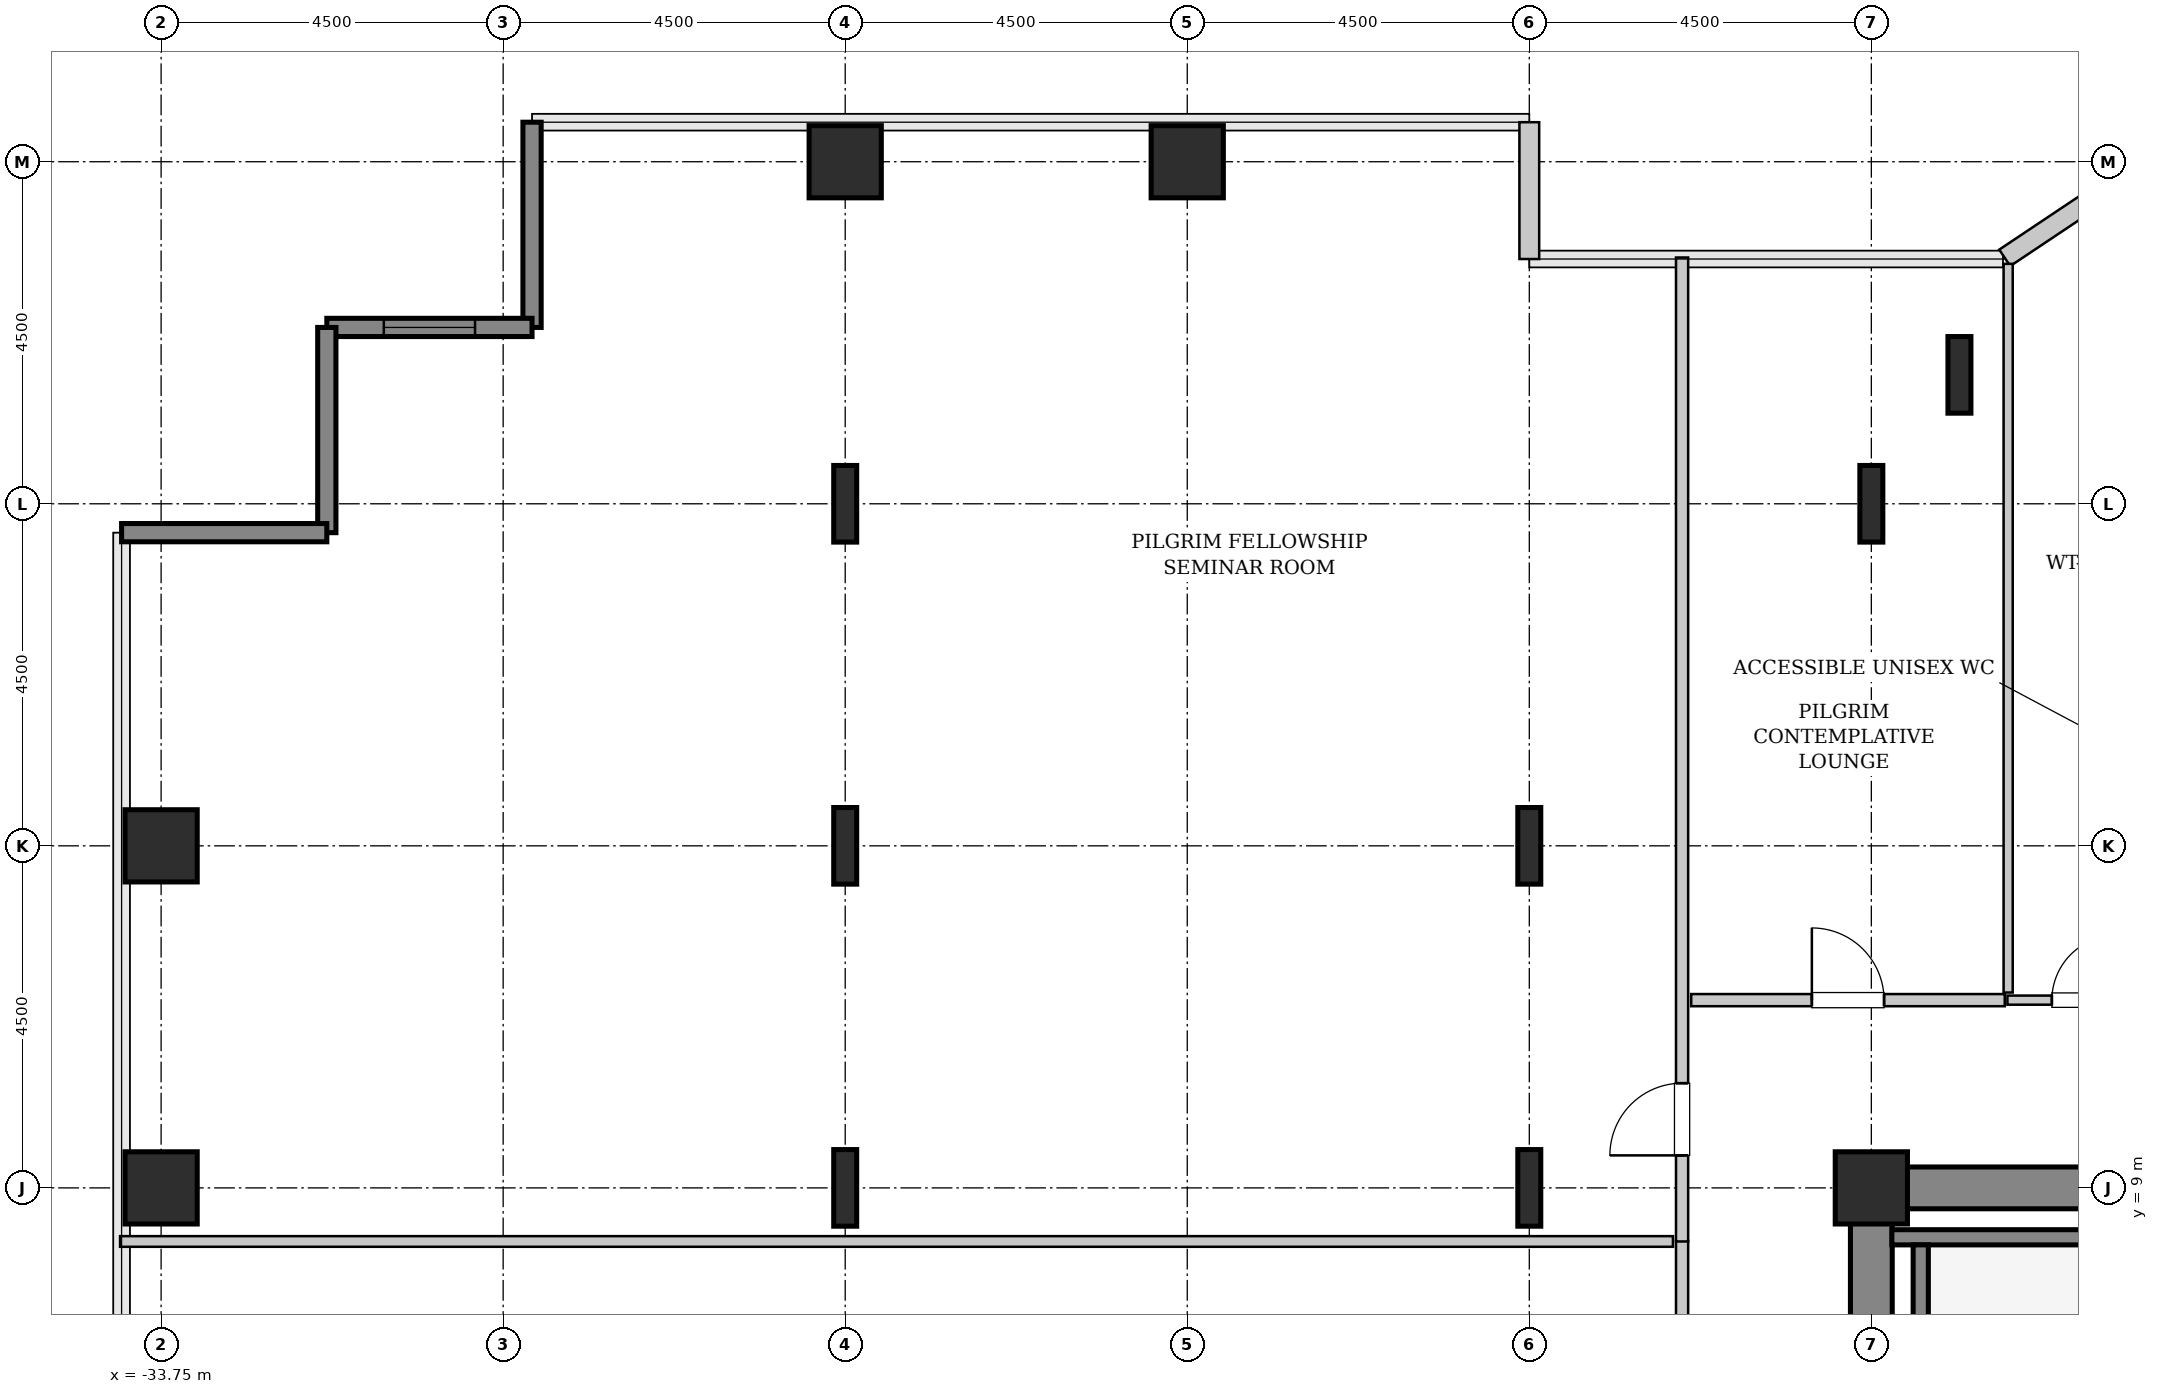
"""IFC4 building model, lengths in metres.
Left out: names, types, materials, properties, quantities, classifications, styles, units other than length and angle.
Written with IfcOpenShell. Run it as: python <this file> out.ifc"""

import sys

from ifc_helpers import new_model, si_unit, direction, frame, frame_2d, origin, origin_2d, place, context, subcontext, project, spatial, rectangle, hollow_rectangle, i_section, extrude, source, transform, mapped, element, fill, save


model = new_model("IFC4")
c1 = context("Model", 3, precision=1e-05, world=origin(), true_north=direction((0.0, 1.0)))
c2 = subcontext(c1, "Body", "Model", "MODEL_VIEW")
j1 = project(units=[si_unit("LENGTHUNIT", "METRE"), si_unit("PLANEANGLEUNIT", "RADIAN")], contexts=[c1])
p1 = place(None, origin())
s1 = spatial("IfcSite", under=j1, at=p1, CompositionType="ELEMENT")
p2 = place(p1, origin())
s2 = spatial("IfcBuilding", under=s1, at=p2, CompositionType="ELEMENT")
p3 = place(p2, frame((0.0, 0.0, 94.6)))
s3 = spatial("IfcBuildingStorey", under=s2, at=p3, CompositionType="ELEMENT", Elevation=94.6)
m1 = source(origin(), c2, "Body", "SweptSolid", [
    extrude(rectangle(XDim=9.975, YDim=0.55, at=frame_2d((4.987, 0.0))), origin(), (0.0, 0.0, 1.0), 3.8),
])
p4 = place(p3, frame((-11.525, 9.0, 0.0), z_axis=(0.0, 0.0, 1.0), x_axis=(1.0, 0.0, 0.0)))
e1 = element("IfcWall", 1, at=p4, inside=s3, PredefinedType="SHEAR", context=c2, shape_type="MappedRepresentation", body=[
    mapped(m1, transform((0.0, 0.0, 0.0), x_axis=(1.0, 0.0, 0.0), y_axis=(0.0, 1.0, 0.0), z_axis=(0.0, 0.0, 1.0), scale=1.0)),
])
m2 = source(origin(), c2, "Body", "SweptSolid", [
    extrude(rectangle(XDim=7.375, YDim=0.55, at=frame_2d((3.688, 0.0))), origin(), (0.0, 0.0, 1.0), 3.8),
])
p5 = place(p3, frame((-11.25, 1.35, 0.0), z_axis=(0.0, 0.0, 1.0), x_axis=(0.0, 1.0, 0.0)))
e2 = element("IfcWall", 2, at=p5, inside=s3, PredefinedType="SHEAR", context=c2, shape_type="MappedRepresentation", body=[
    mapped(m2, transform((0.0, 0.0, 0.0), x_axis=(1.0, 0.0, 0.0), y_axis=(0.0, 1.0, 0.0), z_axis=(0.0, 0.0, 1.0), scale=1.0)),
])
m3 = source(origin(), c2, "Body", "SweptSolid", [
    extrude(hollow_rectangle(XDim=0.95, YDim=0.95, WallThickness=0.045, InnerFilletRadius=0.045, OuterFilletRadius=0.09, at=origin_2d()), origin(), (0.0, 0.0, 1.0), 3.8),
])
for number, where, z_axis, x_axis in (
    (3, (-33.75, 9.0, 0.0), (0.0, 0.0, 1.0), (1.0, 0.0, 0.0)),
    (4, (-33.75, 13.5, 0.0), (0.0, 0.0, 1.0), (1.0, 0.0, 0.0)),
):
    element("IfcColumn", number, at=place(p3, frame(where, z_axis=z_axis, x_axis=x_axis)), inside=s3, PredefinedType="COLUMN", context=c2, shape_type="MappedRepresentation", body=[
        mapped(m3, transform((0.0, 0.0, 0.0), x_axis=(1.0, 0.0, 0.0), y_axis=(0.0, 1.0, 0.0), z_axis=(0.0, 0.0, 1.0), scale=1.0)),
    ])
m4 = source(origin(), c2, "Body", "SweptSolid", [
    extrude(i_section(OverallWidth=0.302, OverallDepth=1.008, WebThickness=0.021, FlangeThickness=0.04, FilletRadius=0.03, at=origin_2d()), origin(), (0.0, 0.0, 1.0), 3.8),
])
for number, where, z_axis, x_axis in (
    (5, (-24.75, 9.0, 0.0), (0.0, 0.0, 1.0), (1.0, 0.0, 0.0)),
    (6, (-24.75, 13.5, 0.0), (0.0, 0.0, 1.0), (1.0, 0.0, 0.0)),
    (7, (-24.75, 18.0, 0.0), (0.0, 0.0, 1.0), (1.0, 0.0, 0.0)),
):
    element("IfcColumn", number, at=place(p3, frame(where, z_axis=z_axis, x_axis=x_axis)), inside=s3, PredefinedType="COLUMN", context=c2, shape_type="MappedRepresentation", body=[
        mapped(m4, transform((0.0, 0.0, 0.0), x_axis=(1.0, 0.0, 0.0), y_axis=(0.0, 1.0, 0.0), z_axis=(0.0, 0.0, 1.0), scale=1.0)),
    ])
for number, where, z_axis, x_axis in (
    (8, (-24.75, 22.5, 0.0), (0.0, 0.0, 1.0), (1.0, 0.0, 0.0)),
    (9, (-20.25, 22.5, 0.0), (0.0, 0.0, 1.0), (1.0, 0.0, 0.0)),
):
    element("IfcColumn", number, at=place(p3, frame(where, z_axis=z_axis, x_axis=x_axis)), inside=s3, PredefinedType="COLUMN", context=c2, shape_type="MappedRepresentation", body=[
        mapped(m3, transform((0.0, 0.0, 0.0), x_axis=(1.0, 0.0, 0.0), y_axis=(0.0, 1.0, 0.0), z_axis=(0.0, 0.0, 1.0), scale=1.0)),
    ])
for number, where, z_axis, x_axis in (
    (10, (-15.75, 9.0, 0.0), (0.0, 0.0, 1.0), (1.0, 0.0, 0.0)),
    (11, (-15.75, 13.5, 0.0), (0.0, 0.0, 1.0), (1.0, 0.0, 0.0)),
):
    element("IfcColumn", number, at=place(p3, frame(where, z_axis=z_axis, x_axis=x_axis)), inside=s3, PredefinedType="COLUMN", context=c2, shape_type="MappedRepresentation", body=[
        mapped(m4, transform((0.0, 0.0, 0.0), x_axis=(1.0, 0.0, 0.0), y_axis=(0.0, 1.0, 0.0), z_axis=(0.0, 0.0, 1.0), scale=1.0)),
    ])
m5 = source(origin(), c2, "Body", "SweptSolid", [
    extrude(hollow_rectangle(XDim=0.95, YDim=0.95, WallThickness=0.045, InnerFilletRadius=0.045, OuterFilletRadius=0.09, at=origin_2d()), origin(), (0.0, 0.0, 1.0), 3.8),
])
p6 = place(p3, frame((-11.25, 9.0, 0.0), z_axis=(0.0, 0.0, 1.0), x_axis=(1.0, 0.0, 0.0)))
e12 = element("IfcColumn", 12, at=p6, inside=s3, PredefinedType="COLUMN", context=c2, shape_type="MappedRepresentation", body=[
    mapped(m5, transform((0.0, 0.0, 0.0), x_axis=(1.0, 0.0, 0.0), y_axis=(0.0, 1.0, 0.0), z_axis=(0.0, 0.0, 1.0), scale=1.0)),
])
for number, where, z_axis, x_axis in (
    (13, (-11.25, 18.0, 0.0), (0.0, 0.0, 1.0), (1.0, 0.0, 0.0)),
    (14, (-10.091, 19.696, 0.0), (0.0, 0.0, 1.0), (1.0, 0.0, 0.0)),
):
    element("IfcColumn", number, at=place(p3, frame(where, z_axis=z_axis, x_axis=x_axis)), inside=s3, PredefinedType="COLUMN", context=c2, shape_type="MappedRepresentation", body=[
        mapped(m4, transform((0.0, 0.0, 0.0), x_axis=(1.0, 0.0, 0.0), y_axis=(0.0, 1.0, 0.0), z_axis=(0.0, 0.0, 1.0), scale=1.0)),
    ])
m6 = source(origin(), c2, "Body", "SweptSolid", [
    extrude(rectangle(XDim=1.469, YDim=0.26, at=frame_2d((0.734, 0.0))), origin(), (0.0, 0.0, 1.0), 3.55),
])
p7 = place(p3, frame((-8.273, 22.052, 0.0), z_axis=(0.0, 0.0, 1.0), x_axis=(-0.831461760506, -0.555581983884, 0.0)))
e15 = element("IfcWall", 15, at=p7, inside=s3, PredefinedType="SOLIDWALL", context=c2, shape_type="MappedRepresentation", body=[
    mapped(m6, transform((0.0, 0.0, 0.0), x_axis=(1.0, 0.0, 0.0), y_axis=(0.0, 1.0, 0.0), z_axis=(0.0, 0.0, 1.0), scale=1.0)),
])
m7 = source(origin(), c2, "Body", "SweptSolid", [
    extrude(rectangle(XDim=1.8, YDim=0.26, at=frame_2d((0.9, 0.0))), origin(), (0.0, 0.0, 1.0), 3.55),
])
p8 = place(p3, frame((-15.75, 21.22, 0.0), z_axis=(0.0, 0.0, 1.0), x_axis=(0.0, 1.0, 0.0)))
e16 = element("IfcWall", 16, at=p8, inside=s3, PredefinedType="SOLIDWALL", context=c2, shape_type="MappedRepresentation", body=[
    mapped(m7, transform((0.0, 0.0, 0.0), x_axis=(1.0, 0.0, 0.0), y_axis=(0.0, 1.0, 0.0), z_axis=(0.0, 0.0, 1.0), scale=1.0)),
])
m8 = source(origin(), c2, "Body", "SweptSolid", [
    extrude(rectangle(XDim=2.7, YDim=0.24, at=frame_2d((1.35, 0.0))), origin(), (0.0, 0.0, 1.0), 3.55),
])
p9 = place(p3, frame((-28.87, 23.02, 0.0), z_axis=(0.0, 0.0, 1.0), x_axis=(0.0, -1.0, 0.0)))
e17 = element("IfcWall", 17, at=p9, inside=s3, PredefinedType="SHEAR", context=c2, shape_type="MappedRepresentation", body=[
    mapped(m8, transform((0.0, 0.0, 0.0), x_axis=(1.0, 0.0, 0.0), y_axis=(0.0, 1.0, 0.0), z_axis=(0.0, 0.0, 1.0), scale=1.0)),
])
p10 = place(p3, frame((-28.87, 20.32, 0.0), z_axis=(0.0, 0.0, 1.0), x_axis=(-1.0, 0.0, 0.0)))
e18 = element("IfcWall", 18, at=p10, inside=s3, PredefinedType="SHEAR", context=c2, shape_type="MappedRepresentation", body=[
    mapped(m8, transform((0.0, 0.0, 0.0), x_axis=(1.0, 0.0, 0.0), y_axis=(0.0, 1.0, 0.0), z_axis=(0.0, 0.0, 1.0), scale=1.0)),
])
p11 = place(p10, frame((0.75, 0.0, 0.85)))
e19 = element("IfcOpeningElement", 19, at=p11, cuts=e18, PredefinedType="OPENING", context=c2, shape_type="SweptSolid", body=[
    extrude(rectangle(XDim=1.2, YDim=1.8, at=frame_2d((0.6, 0.9))), frame((0.0, 0.13, 0.0), z_axis=(0.0, -1.0, 0.0), x_axis=(1.0, 0.0, 0.0)), (0.0, 0.0, 1.0), 0.26),
])
for number, where, z_axis, x_axis in (
    (20, (-31.57, 20.32, 0.0), (0.0, 0.0, 1.0), (0.0, -1.0, 0.0)),
    (21, (-31.57, 17.62, 0.0), (0.0, 0.0, 1.0), (-1.0, 0.0, 0.0)),
):
    element("IfcWall", number, at=place(p3, frame(where, z_axis=z_axis, x_axis=x_axis)), inside=s3, PredefinedType="SHEAR", context=c2, shape_type="MappedRepresentation", body=[
        mapped(m8, transform((0.0, 0.0, 0.0), x_axis=(1.0, 0.0, 0.0), y_axis=(0.0, 1.0, 0.0), z_axis=(0.0, 0.0, 1.0), scale=1.0)),
    ])
m9 = source(origin(), c2, "Body", "SweptSolid", [
    extrude(rectangle(XDim=3.68, YDim=0.2, at=frame_2d((1.84, 0.0))), origin(), (0.0, 0.0, 1.0), 3.8),
])
p12 = place(p3, frame((-7.3, 8.35, 0.0), z_axis=(0.0, 0.0, 1.0), x_axis=(-1.0, 0.0, 0.0)))
e22 = element("IfcWall", 22, at=p12, inside=s3, PredefinedType="SOLIDWALL", context=c2, shape_type="MappedRepresentation", body=[
    mapped(m9, transform((0.0, 0.0, 0.0), x_axis=(1.0, 0.0, 0.0), y_axis=(0.0, 1.0, 0.0), z_axis=(0.0, 0.0, 1.0), scale=1.0)),
])
m10 = source(origin(), c2, "Body", "SweptSolid", [
    extrude(rectangle(XDim=7.1, YDim=0.2, at=frame_2d((3.55, 0.0))), origin(), (0.0, 0.0, 1.0), 3.8),
])
p13 = place(p3, frame((-10.6, 1.15, 0.0), z_axis=(0.0, 0.0, 1.0), x_axis=(0.0, 1.0, 0.0)))
e23 = element("IfcWall", 23, at=p13, inside=s3, PredefinedType="SOLIDWALL", context=c2, shape_type="MappedRepresentation", body=[
    mapped(m10, transform((0.0, 0.0, 0.0), x_axis=(1.0, 0.0, 0.0), y_axis=(0.0, 1.0, 0.0), z_axis=(0.0, 0.0, 1.0), scale=1.0)),
])
m11 = source(origin(), c2, "Body", "SweptSolid", [
    extrude(rectangle(XDim=2.02, YDim=0.12, at=frame_2d((1.01, 0.0))), origin(), (0.0, 0.0, 1.0), 3.535),
])
p14 = place(p3, frame((-9.46, 11.47, 0.0), z_axis=(0.0, 0.0, 1.0), x_axis=(1.0, 0.0, 0.0)))
e24 = element("IfcWall", 24, at=p14, inside=s3, PredefinedType="PLUMBINGWALL", context=c2, shape_type="MappedRepresentation", body=[
    mapped(m11, transform((0.0, 0.0, 0.0), x_axis=(1.0, 0.0, 0.0), y_axis=(0.0, 1.0, 0.0), z_axis=(0.0, 0.0, 1.0), scale=1.0)),
])
p15 = place(p14, frame((0.585, 0.0, 0.0)))
e25 = element("IfcOpeningElement", 25, at=p15, cuts=e24, PredefinedType="OPENING", context=c2, shape_type="SweptSolid", body=[
    extrude(rectangle(XDim=0.85, YDim=2.1, at=frame_2d((0.425, 1.05))), frame((0.0, 0.07, 0.0), z_axis=(0.0, -1.0, 0.0), x_axis=(1.0, 0.0, 0.0)), (0.0, 0.0, 1.0), 0.14),
])
m12 = source(origin(), c2, "Body", "SweptSolid", [
    extrude(rectangle(XDim=9.587, YDim=0.12, at=frame_2d((4.793, 0.0))), origin(), (0.0, 0.0, 1.0), 3.535),
])
p16 = place(p3, frame((-9.45, 11.57, 0.0), z_axis=(0.0, 0.0, 1.0), x_axis=(0.0, 1.0, 0.0)))
e26 = element("IfcWall", 26, at=p16, inside=s3, PredefinedType="PLUMBINGWALL", context=c2, shape_type="MappedRepresentation", body=[
    mapped(m12, transform((0.0, 0.0, 0.0), x_axis=(1.0, 0.0, 0.0), y_axis=(0.0, 1.0, 0.0), z_axis=(0.0, 0.0, 1.0), scale=1.0)),
])
m13 = source(origin(), c2, "Body", "SweptSolid", [
    extrude(rectangle(XDim=3.3, YDim=0.16, at=frame_2d((1.65, 0.0))), origin(), (0.0, 0.0, 1.0), 3.535),
])
p17 = place(p3, frame((-13.74, 5.005, 0.0), z_axis=(0.0, 0.0, 1.0), x_axis=(0.0, 1.0, 0.0)))
e27 = element("IfcWall", 27, at=p17, inside=s3, PredefinedType="PARTITIONING", context=c2, shape_type="MappedRepresentation", body=[
    mapped(m13, transform((0.0, 0.0, 0.0), x_axis=(1.0, 0.0, 0.0), y_axis=(0.0, 1.0, 0.0), z_axis=(0.0, 0.0, 1.0), scale=1.0)),
])
p18 = place(p17, frame((1.175, 0.0, 0.0)))
e28 = element("IfcOpeningElement", 28, at=p18, cuts=e27, PredefinedType="OPENING", context=c2, shape_type="SweptSolid", body=[
    extrude(rectangle(XDim=0.95, YDim=2.1, at=frame_2d((0.475, 1.05))), frame((0.0, 0.09, 0.0), z_axis=(0.0, -1.0, 0.0), x_axis=(1.0, 0.0, 0.0)), (0.0, 0.0, 1.0), 0.18),
])
m14 = source(origin(), c2, "Body", "SweptSolid", [
    extrude(rectangle(XDim=20.43, YDim=0.14, at=frame_2d((10.215, 0.0))), origin(), (0.0, 0.0, 1.0), 3.535),
])
p19 = place(p3, frame((-34.29, 8.295, 0.0), z_axis=(0.0, 0.0, 1.0), x_axis=(1.0, 0.0, 0.0)))
e29 = element("IfcWall", 29, at=p19, inside=s3, PredefinedType="PARTITIONING", context=c2, shape_type="MappedRepresentation", body=[
    mapped(m14, transform((0.0, 0.0, 0.0), x_axis=(1.0, 0.0, 0.0), y_axis=(0.0, 1.0, 0.0), z_axis=(0.0, 0.0, 1.0), scale=1.0)),
])
m15 = source(origin(), c2, "Body", "SweptSolid", [
    extrude(rectangle(XDim=12.945, YDim=0.16, at=frame_2d((6.473, 0.0))), origin(), (0.0, 0.0, 1.0), 3.535),
])
p20 = place(p3, frame((-13.74, 8.295, 0.0), z_axis=(0.0, 0.0, 1.0), x_axis=(0.0, 1.0, 0.0)))
e30 = element("IfcWall", 30, at=p20, inside=s3, PredefinedType="PARTITIONING", context=c2, shape_type="MappedRepresentation", body=[
    mapped(m15, transform((0.0, 0.0, 0.0), x_axis=(1.0, 0.0, 0.0), y_axis=(0.0, 1.0, 0.0), z_axis=(0.0, 0.0, 1.0), scale=1.0)),
])
p21 = place(p20, frame((1.133, 0.0, 0.0)))
e31 = element("IfcOpeningElement", 31, at=p21, cuts=e30, PredefinedType="OPENING", context=c2, shape_type="SweptSolid", body=[
    extrude(rectangle(XDim=0.95, YDim=2.1, at=frame_2d((0.475, 1.05))), frame((0.0, 0.09, 0.0), z_axis=(0.0, -1.0, 0.0), x_axis=(1.0, 0.0, 0.0)), (0.0, 0.0, 1.0), 0.18),
])
m16 = source(origin(), c2, "Body", "SweptSolid", [
    extrude(rectangle(XDim=4.125, YDim=0.16, at=frame_2d((2.062, 0.0))), origin(), (0.0, 0.0, 1.0), 3.535),
])
p22 = place(p3, frame((-13.62, 11.47, 0.0), z_axis=(0.0, 0.0, 1.0), x_axis=(1.0, 0.0, 0.0)))
e32 = element("IfcWall", 32, at=p22, inside=s3, PredefinedType="PARTITIONING", context=c2, shape_type="MappedRepresentation", body=[
    mapped(m16, transform((0.0, 0.0, 0.0), x_axis=(1.0, 0.0, 0.0), y_axis=(0.0, 1.0, 0.0), z_axis=(0.0, 0.0, 1.0), scale=1.0)),
])
p23 = place(p22, frame((1.587, 0.0, 0.0)))
e33 = element("IfcOpeningElement", 33, at=p23, cuts=e32, PredefinedType="OPENING", context=c2, shape_type="SweptSolid", body=[
    extrude(rectangle(XDim=0.95, YDim=2.1, at=frame_2d((0.475, 1.05))), frame((0.0, 0.09, 0.0), z_axis=(0.0, -1.0, 0.0), x_axis=(1.0, 0.0, 0.0)), (0.0, 0.0, 1.0), 0.18),
])
m17 = source(origin(), c2, "Body", "SweptSolid", [
    extrude(rectangle(XDim=1.2, YDim=1.8, at=frame_2d((0.6, 0.9))), frame((0.0, 0.03, 0.0), z_axis=(0.0, -1.0, 0.0), x_axis=(1.0, 0.0, 0.0)), (0.0, 0.0, 1.0), 0.06),
])
p24 = place(p11, origin())
e34 = element("IfcWindow", 34, at=p24, inside=s3, PartitioningType="SINGLE_PANEL", PredefinedType="WINDOW", context=c2, shape_type="MappedRepresentation", body=[
    mapped(m17, transform((0.0, 0.0, 0.0), x_axis=(1.0, 0.0, 0.0), y_axis=(0.0, 1.0, 0.0), z_axis=(0.0, 0.0, 1.0), scale=1.0)),
])
fill(e19, e34)
m18 = source(origin(), c2, "Body", "SweptSolid", [
    extrude(rectangle(XDim=0.85, YDim=2.1, at=frame_2d((0.425, 1.05))), frame((0.0, 0.025, 0.0), z_axis=(0.0, -1.0, 0.0), x_axis=(1.0, 0.0, 0.0)), (0.0, 0.0, 1.0), 0.05),
])
p25 = place(p15, origin())
e35 = element("IfcDoor", 35, at=p25, inside=s3, OperationType="SINGLE_SWING_RIGHT", PredefinedType="DOOR", context=c2, shape_type="MappedRepresentation", body=[
    mapped(m18, transform((0.0, 0.0, 0.0), x_axis=(1.0, 0.0, 0.0), y_axis=(0.0, 1.0, 0.0), z_axis=(0.0, 0.0, 1.0), scale=1.0)),
])
fill(e25, e35)
m19 = source(origin(), c2, "Body", "SweptSolid", [
    extrude(rectangle(XDim=0.95, YDim=2.1, at=frame_2d((0.475, 1.05))), frame((0.0, 0.025, 0.0), z_axis=(0.0, -1.0, 0.0), x_axis=(1.0, 0.0, 0.0)), (0.0, 0.0, 1.0), 0.05),
])
p26 = place(p21, origin())
e36 = element("IfcDoor", 36, at=p26, inside=s3, OperationType="SINGLE_SWING_LEFT", PredefinedType="DOOR", context=c2, shape_type="MappedRepresentation", body=[
    mapped(m19, transform((0.0, 0.0, 0.0), x_axis=(1.0, 0.0, 0.0), y_axis=(0.0, 1.0, 0.0), z_axis=(0.0, 0.0, 1.0), scale=1.0)),
])
fill(e31, e36)
p27 = place(p23, origin())
e37 = element("IfcDoor", 37, at=p27, inside=s3, OperationType="SINGLE_SWING_LEFT", PredefinedType="DOOR", context=c2, shape_type="MappedRepresentation", body=[
    mapped(m19, transform((0.0, 0.0, 0.0), x_axis=(1.0, 0.0, 0.0), y_axis=(0.0, 1.0, 0.0), z_axis=(0.0, 0.0, 1.0), scale=1.0)),
])
fill(e33, e37)
save(model, sys.argv[1])
